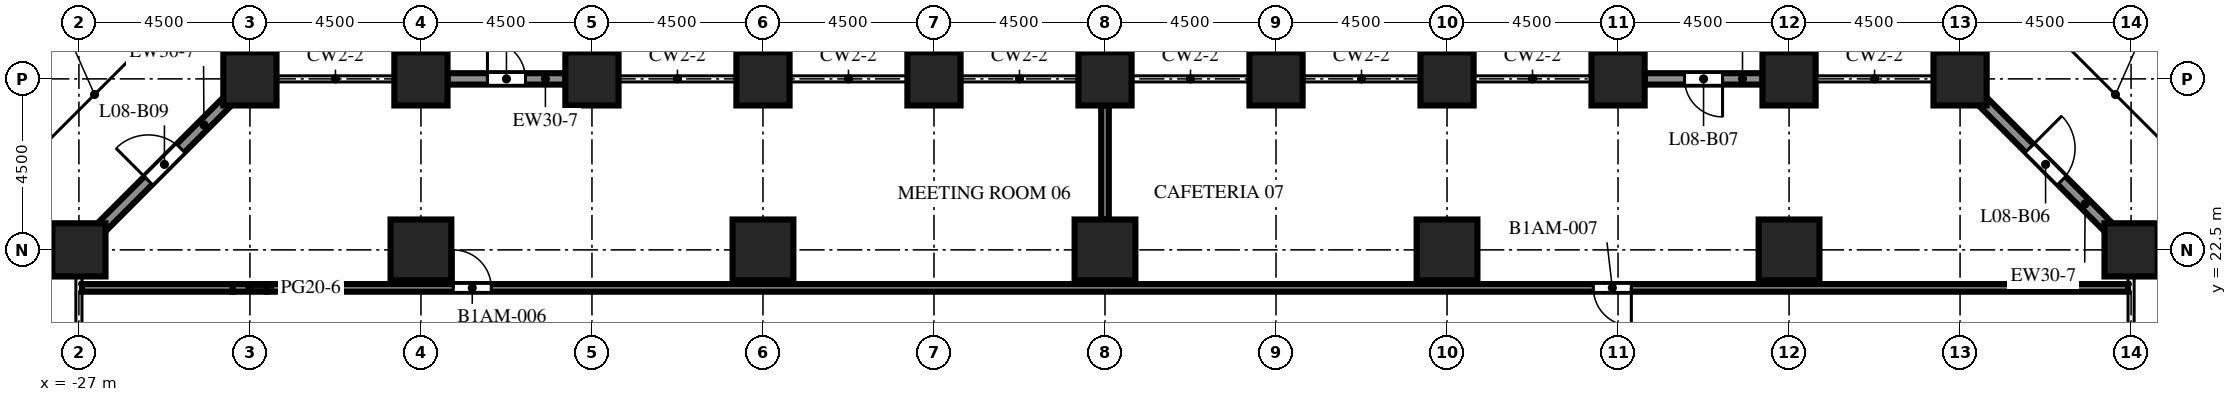
"""IFC4 building model, lengths in metres.
Left out: names, types, materials, properties, quantities, classifications, styles, units other than length and angle.
Written with IfcOpenShell. Run it as: python <this file> out.ifc"""

import sys

from ifc_helpers import new_model, si_unit, direction, frame, frame_2d, origin, origin_2d, place, context, subcontext, project, spatial, rectangle, extrude, element, fill, save


model = new_model("IFC4")
c1 = context("Model", 3, precision=1e-05, world=origin(), true_north=direction((0.0, 1.0)))
c2 = subcontext(c1, "Body", "Model", "MODEL_VIEW")
j1 = project(units=[si_unit("LENGTHUNIT", "METRE"), si_unit("PLANEANGLEUNIT", "RADIAN")], contexts=[c1])
p1 = place(None, origin())
s1 = spatial("IfcSite", under=j1, at=p1, CompositionType="ELEMENT")
p2 = place(p1, origin())
s2 = spatial("IfcBuilding", under=s1, at=p2, CompositionType="ELEMENT")
p3 = place(p2, frame((0.0, 0.0, 35.9)))
s3 = spatial("IfcBuildingStorey", under=s2, at=p3, CompositionType="ELEMENT", Elevation=35.9)
p4 = place(p3, frame((-27.0, 22.5, 0.0), z_axis=(0.0, 0.0, 1.0), x_axis=(1.0, 0.0, 0.0)))
e1 = element("IfcColumn", 1, at=p4, inside=s3, PredefinedType="COLUMN", context=c2, shape_type="SweptSolid", body=[
    extrude(rectangle(XDim=1.4, YDim=1.4, at=origin_2d()), origin(), (0.0, 0.0, 1.0), 6.0),
])
p5 = place(p3, frame((-22.5, 27.0, 0.0), z_axis=(0.0, 0.0, 1.0), x_axis=(1.0, 0.0, 0.0)))
e2 = element("IfcColumn", 2, at=p5, inside=s3, PredefinedType="COLUMN", context=c2, shape_type="SweptSolid", body=[
    extrude(rectangle(XDim=1.4, YDim=1.4, at=origin_2d()), origin(), (0.0, 0.0, 1.0), 3.75),
])
for number, where, z_axis, x_axis in (
    (3, (-18.0, 27.0, 0.0), (0.0, 0.0, 1.0), (1.0, 0.0, 0.0)),
    (4, (-13.5, 27.0, 0.0), (0.0, 0.0, 1.0), (1.0, 0.0, 0.0)),
    (5, (-9.0, 27.0, 0.0), (0.0, 0.0, 1.0), (1.0, 0.0, 0.0)),
    (6, (-4.5, 27.0, 0.0), (0.0, 0.0, 1.0), (1.0, 0.0, 0.0)),
    (7, (0.0, 27.0, 0.0), (0.0, 0.0, 1.0), (1.0, 0.0, 0.0)),
    (8, (4.5, 27.0, 0.0), (0.0, 0.0, 1.0), (1.0, 0.0, 0.0)),
    (9, (9.0, 27.0, 0.0), (0.0, 0.0, 1.0), (1.0, 0.0, 0.0)),
    (10, (13.5, 27.0, 0.0), (0.0, 0.0, 1.0), (1.0, 0.0, 0.0)),
    (11, (18.0, 27.0, 0.0), (0.0, 0.0, 1.0), (1.0, 0.0, 0.0)),
    (12, (22.5, 27.0, 0.0), (0.0, 0.0, 1.0), (1.0, 0.0, 0.0)),
    (13, (27.0, 22.5, 0.0), (0.0, 0.0, 1.0), (1.0, 0.0, 0.0)),
):
    element("IfcColumn", number, at=place(p3, frame(where, z_axis=z_axis, x_axis=x_axis)), inside=s3, PredefinedType="COLUMN", context=c2, shape_type="SweptSolid", body=[
        extrude(rectangle(XDim=1.4, YDim=1.4, at=origin_2d()), origin(), (0.0, 0.0, 1.0), 6.0),
    ])
for number, where, z_axis, x_axis in (
    (14, (-18.0, 22.5, 0.0), (0.0, 0.0, 1.0), (1.0, 0.0, 0.0)),
    (15, (-9.0, 22.5, 0.0), (0.0, 0.0, 1.0), (1.0, 0.0, 0.0)),
    (16, (0.0, 22.5, 0.0), (0.0, 0.0, 1.0), (1.0, 0.0, 0.0)),
    (17, (9.0, 22.5, 0.0), (0.0, 0.0, 1.0), (1.0, 0.0, 0.0)),
    (18, (18.0, 22.5, 0.0), (0.0, 0.0, 1.0), (1.0, 0.0, 0.0)),
):
    element("IfcColumn", number, at=place(p3, frame(where, z_axis=z_axis, x_axis=x_axis)), inside=s3, PredefinedType="COLUMN", context=c2, shape_type="SweptSolid", body=[
        extrude(rectangle(XDim=1.6, YDim=1.6, at=origin_2d()), origin(), (0.0, 0.0, 1.0), 6.0),
    ])
p6 = place(p3, frame((23.094, 26.406, 0.0), z_axis=(0.0, 0.0, 1.0), x_axis=(0.707106781187, -0.707106781187, 0.0)))
e19 = element("IfcWall", 19, at=p6, inside=s3, PredefinedType="SOLIDWALL", context=c2, shape_type="SweptSolid", body=[
    extrude(rectangle(XDim=4.684, YDim=0.3, at=frame_2d((2.342, 0.0))), origin(), (0.0, 0.0, 1.0), 4.65),
])
p7 = place(p6, frame((1.742, 0.0, 0.0)))
e20 = element("IfcOpeningElement", 20, at=p7, cuts=e19, PredefinedType="OPENING", context=c2, shape_type="SweptSolid", body=[
    extrude(rectangle(XDim=1.2, YDim=2.2, at=frame_2d((0.6, 1.1))), frame((0.0, 0.16, 0.0), z_axis=(0.0, -1.0, 0.0), x_axis=(1.0, 0.0, 0.0)), (0.0, 0.0, 1.0), 0.32),
])
p8 = place(p3, frame((14.2, 27.0, 0.0), z_axis=(0.0, 0.0, 1.0), x_axis=(1.0, 0.0, 0.0)))
e21 = element("IfcWall", 21, at=p8, inside=s3, PredefinedType="SOLIDWALL", context=c2, shape_type="SweptSolid", body=[
    extrude(rectangle(XDim=3.1, YDim=0.3, at=frame_2d((1.55, 0.0))), origin(), (0.0, 0.0, 1.0), 4.65),
])
p9 = place(p8, frame((1.05, 0.0, 0.0)))
e22 = element("IfcOpeningElement", 22, at=p9, cuts=e21, PredefinedType="OPENING", context=c2, shape_type="SweptSolid", body=[
    extrude(rectangle(XDim=1.0, YDim=2.2, at=frame_2d((0.5, 1.1))), frame((0.0, 0.16, 0.0), z_axis=(0.0, -1.0, 0.0), x_axis=(1.0, 0.0, 0.0)), (0.0, 0.0, 1.0), 0.32),
])
p10 = place(p3, frame((-17.3, 27.0, 0.0), z_axis=(0.0, 0.0, 1.0), x_axis=(1.0, 0.0, 0.0)))
e23 = element("IfcWall", 23, at=p10, inside=s3, PredefinedType="SOLIDWALL", context=c2, shape_type="SweptSolid", body=[
    extrude(rectangle(XDim=3.1, YDim=0.3, at=frame_2d((1.55, 0.0))), origin(), (0.0, 0.0, 1.0), 4.65),
])
p11 = place(p10, frame((1.05, 0.0, 0.0)))
e24 = element("IfcOpeningElement", 24, at=p11, cuts=e23, PredefinedType="OPENING", context=c2, shape_type="SweptSolid", body=[
    extrude(rectangle(XDim=1.0, YDim=2.2, at=frame_2d((0.5, 1.1))), frame((0.0, 0.16, 0.0), z_axis=(0.0, -1.0, 0.0), x_axis=(1.0, 0.0, 0.0)), (0.0, 0.0, 1.0), 0.32),
])
p12 = place(p3, frame((-26.406, 23.094, 0.0), z_axis=(0.0, 0.0, 1.0), x_axis=(0.707106781187, 0.707106781187, 0.0)))
e25 = element("IfcWall", 25, at=p12, inside=s3, PredefinedType="SOLIDWALL", context=c2, shape_type="SweptSolid", body=[
    extrude(rectangle(XDim=4.684, YDim=0.3, at=frame_2d((2.342, 0.0))), origin(), (0.0, 0.0, 1.0), 4.65),
])
p13 = place(p12, frame((1.742, 0.0, 0.0)))
e26 = element("IfcOpeningElement", 26, at=p13, cuts=e25, PredefinedType="OPENING", context=c2, shape_type="SweptSolid", body=[
    extrude(rectangle(XDim=1.2, YDim=2.2, at=frame_2d((0.6, 1.1))), frame((0.0, 0.16, 0.0), z_axis=(0.0, -1.0, 0.0), x_axis=(1.0, 0.0, 0.0)), (0.0, 0.0, 1.0), 0.32),
])
p14 = place(p3, frame((0.0, 23.3, 0.0), z_axis=(0.0, 0.0, 1.0), x_axis=(0.0, 1.0, 0.0)))
e27 = element("IfcWall", 27, at=p14, inside=s3, PredefinedType="PARTITIONING", context=c2, shape_type="SweptSolid", body=[
    extrude(rectangle(XDim=3.0, YDim=0.2, at=frame_2d((1.5, 0.0))), origin(), (0.0, 0.0, 1.0), 5.55),
])
p15 = place(p3, frame((-26.92, 21.5, 0.0), z_axis=(0.0, 0.0, 1.0), x_axis=(1.0, 0.0, 0.0)))
e28 = element("IfcWall", 28, at=p15, inside=s3, PredefinedType="PARTITIONING", context=c2, shape_type="SweptSolid", body=[
    extrude(rectangle(XDim=3.97, YDim=0.2, at=frame_2d((1.985, 0.0))), origin(), (0.0, 0.0, 1.0), 5.55),
])
p16 = place(p3, frame((-22.95, 21.5, 0.0), z_axis=(0.0, 0.0, 1.0), x_axis=(1.0, 0.0, 0.0)))
e29 = element("IfcWall", 29, at=p16, inside=s3, PredefinedType="PARTITIONING", context=c2, shape_type="SweptSolid", body=[
    extrude(rectangle(XDim=0.9, YDim=0.2, at=frame_2d((0.45, 0.0))), origin(), (0.0, 0.0, 1.0), 3.72),
])
p17 = place(p3, frame((-22.05, 21.5, 0.0), z_axis=(0.0, 0.0, 1.0), x_axis=(1.0, 0.0, 0.0)))
e30 = element("IfcWall", 30, at=p17, inside=s3, PredefinedType="PARTITIONING", context=c2, shape_type="SweptSolid", body=[
    extrude(rectangle(XDim=48.97, YDim=0.2, at=frame_2d((24.485, 0.0))), origin(), (0.0, 0.0, 1.0), 5.55),
])
p18 = place(p17, frame((4.9, 0.0, 0.0)))
e31 = element("IfcOpeningElement", 31, at=p18, cuts=e30, PredefinedType="OPENING", context=c2, shape_type="SweptSolid", body=[
    extrude(rectangle(XDim=1.0, YDim=2.1, at=frame_2d((0.5, 1.05))), frame((0.0, 0.11, 0.0), z_axis=(0.0, -1.0, 0.0), x_axis=(1.0, 0.0, 0.0)), (0.0, 0.0, 1.0), 0.22),
])
p19 = place(p17, frame((34.9, 0.0, 0.0)))
e32 = element("IfcOpeningElement", 32, at=p19, cuts=e30, PredefinedType="OPENING", context=c2, shape_type="SweptSolid", body=[
    extrude(rectangle(XDim=1.0, YDim=2.1, at=frame_2d((0.5, 1.05))), frame((0.0, 0.11, 0.0), z_axis=(0.0, -1.0, 0.0), x_axis=(1.0, 0.0, 0.0)), (0.0, 0.0, 1.0), 0.22),
])
p20 = place(p7, origin())
e33 = element("IfcDoor", 33, at=p20, inside=s3, OperationType="SINGLE_SWING_LEFT", PredefinedType="DOOR", context=c2, shape_type="SweptSolid", body=[
    extrude(rectangle(XDim=1.2, YDim=2.2, at=frame_2d((0.6, 1.1))), frame((0.0, 0.025, 0.0), z_axis=(0.0, -1.0, 0.0), x_axis=(1.0, 0.0, 0.0)), (0.0, 0.0, 1.0), 0.05),
])
fill(e20, e33)
p21 = place(p9, origin())
e34 = element("IfcDoor", 34, at=p21, inside=s3, OperationType="SINGLE_SWING_RIGHT", PredefinedType="DOOR", context=c2, shape_type="SweptSolid", body=[
    extrude(rectangle(XDim=1.0, YDim=2.2, at=frame_2d((0.5, 1.1))), frame((0.0, 0.025, 0.0), z_axis=(0.0, -1.0, 0.0), x_axis=(1.0, 0.0, 0.0)), (0.0, 0.0, 1.0), 0.05),
])
fill(e22, e34)
p22 = place(p11, origin())
e35 = element("IfcDoor", 35, at=p22, inside=s3, OperationType="SINGLE_SWING_LEFT", PredefinedType="DOOR", context=c2, shape_type="SweptSolid", body=[
    extrude(rectangle(XDim=1.0, YDim=2.2, at=frame_2d((0.5, 1.1))), frame((0.0, 0.025, 0.0), z_axis=(0.0, -1.0, 0.0), x_axis=(1.0, 0.0, 0.0)), (0.0, 0.0, 1.0), 0.05),
])
fill(e24, e35)
p23 = place(p13, origin())
e36 = element("IfcDoor", 36, at=p23, inside=s3, OperationType="SINGLE_SWING_LEFT", PredefinedType="DOOR", context=c2, shape_type="SweptSolid", body=[
    extrude(rectangle(XDim=1.2, YDim=2.2, at=frame_2d((0.6, 1.1))), frame((0.0, 0.025, 0.0), z_axis=(0.0, -1.0, 0.0), x_axis=(1.0, 0.0, 0.0)), (0.0, 0.0, 1.0), 0.05),
])
fill(e26, e36)
p24 = place(p18, origin())
e37 = element("IfcDoor", 37, at=p24, inside=s3, OperationType="SINGLE_SWING_LEFT", PredefinedType="DOOR", context=c2, shape_type="SweptSolid", body=[
    extrude(rectangle(XDim=1.0, YDim=2.1, at=frame_2d((0.5, 1.05))), frame((0.0, 0.025, 0.0), z_axis=(0.0, -1.0, 0.0), x_axis=(1.0, 0.0, 0.0)), (0.0, 0.0, 1.0), 0.05),
])
fill(e31, e37)
p25 = place(p19, origin())
e38 = element("IfcDoor", 38, at=p25, inside=s3, OperationType="SINGLE_SWING_RIGHT", PredefinedType="DOOR", context=c2, shape_type="SweptSolid", body=[
    extrude(rectangle(XDim=1.0, YDim=2.1, at=frame_2d((0.5, 1.05))), frame((0.0, 0.025, 0.0), z_axis=(0.0, -1.0, 0.0), x_axis=(1.0, 0.0, 0.0)), (0.0, 0.0, 1.0), 0.05),
])
fill(e32, e38)
save(model, sys.argv[1])
